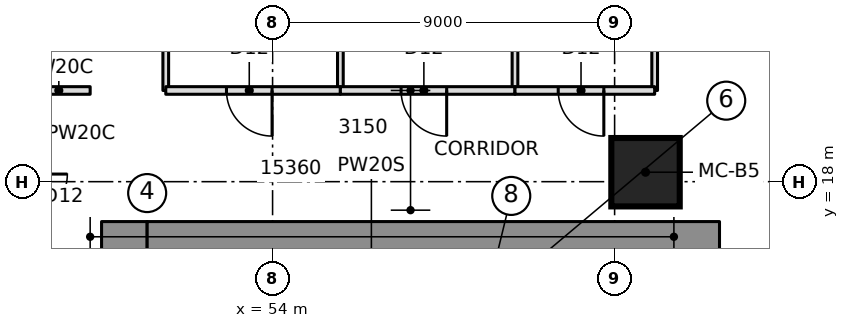
"""IFC4 building model, lengths in metres.
Left out: names, types, materials, properties, quantities, classifications, styles, units other than length and angle.
Written with IfcOpenShell. Run it as: python <this file> out.ifc"""

import sys

from ifc_helpers import new_model, si_unit, direction, frame, frame_2d, origin, origin_2d, place, context, subcontext, project, spatial, rectangle, extrude, element, fill, save


model = new_model("IFC4")
c1 = context("Model", 3, precision=1e-05, world=origin(), true_north=direction((0.0, 1.0)))
c2 = subcontext(c1, "Body", "Model", "MODEL_VIEW")
j1 = project(units=[si_unit("LENGTHUNIT", "METRE"), si_unit("PLANEANGLEUNIT", "RADIAN")], contexts=[c1])
p1 = place(None, origin())
s1 = spatial("IfcSite", under=j1, at=p1, CompositionType="ELEMENT")
p2 = place(p1, origin())
s2 = spatial("IfcBuilding", under=s1, at=p2, CompositionType="ELEMENT")
p3 = place(p2, origin())
s3 = spatial("IfcBuildingStorey", under=s2, at=p3, CompositionType="ELEMENT", Elevation=0.0)
p4 = place(p3, frame((50.1, 6.65, 0.0), z_axis=(0.0, 0.0, 1.0), x_axis=(0.0, 1.0, 0.0)))
e1 = element("IfcWall", 1, at=p4, inside=s3, PredefinedType="SHEAR", context=c2, shape_type="SweptSolid", body=[
    extrude(rectangle(XDim=10.3, YDim=1.2, at=frame_2d((5.15, 0.0))), origin(), (0.0, 0.0, 1.0), 8.0),
])
p5 = place(p4, frame((6.5, 0.0, 0.0)))
e2 = element("IfcOpeningElement", 2, at=p5, cuts=e1, PredefinedType="OPENING", context=c2, shape_type="SweptSolid", body=[
    extrude(rectangle(XDim=1.1, YDim=2.1, at=frame_2d((0.55, 1.05))), frame((0.0, 0.61, 0.0), z_axis=(0.0, -1.0, 0.0), x_axis=(1.0, 0.0, 0.0)), (0.0, 0.0, 1.0), 1.22),
])
p6 = place(p3, frame((50.7, 16.35, 0.0), z_axis=(0.0, 0.0, 1.0), x_axis=(1.0, 0.0, 0.0)))
e3 = element("IfcWall", 3, at=p6, inside=s3, PredefinedType="SHEAR", context=c2, shape_type="SweptSolid", body=[
    extrude(rectangle(XDim=15.06, YDim=1.2, at=frame_2d((7.53, 0.0))), origin(), (0.0, 0.0, 1.0), 8.0),
])
p7 = place(p3, frame((63.813, 18.249, 0.0), z_axis=(0.0, 0.0, 1.0), x_axis=(1.0, 0.0, 0.0)))
e4 = element("IfcColumn", 4, at=p7, inside=s3, PredefinedType="COLUMN", context=c2, shape_type="SweptSolid", body=[
    extrude(rectangle(XDim=1.8, YDim=1.8, at=origin_2d()), origin(), (0.0, 0.0, 1.0), 8.0),
])
for number, where, z_axis, x_axis in (
    (5, (51.189, 20.4, 0.0), (0.0, 0.0, 1.0), (0.0, 1.0, 0.0)),
    (6, (55.784, 20.4, 0.0), (0.0, 0.0, 1.0), (0.0, 1.0, 0.0)),
):
    element("IfcWall", number, at=place(p3, frame(where, z_axis=z_axis, x_axis=x_axis)), inside=s3, PredefinedType="PARTITIONING", context=c2, shape_type="SweptSolid", body=[
        extrude(rectangle(XDim=16.2, YDim=0.15, at=frame_2d((8.1, 0.0))), origin(), (0.0, 0.0, 1.0), 7.65),
    ])
for number, where, z_axis, x_axis in (
    (7, (60.378, 20.4, 0.0), (0.0, 0.0, 1.0), (0.0, 1.0, 0.0)),
    (8, (64.054, 20.4, 0.0), (0.0, 0.0, 1.0), (0.0, 1.0, 0.0)),
):
    element("IfcWall", number, at=place(p3, frame(where, z_axis=z_axis, x_axis=x_axis)), inside=s3, PredefinedType="PARTITIONING", context=c2, shape_type="SweptSolid", body=[
        extrude(rectangle(XDim=16.17, YDim=0.15, at=frame_2d((8.085, 0.0))), origin(), (0.0, 0.0, 1.0), 7.65),
    ])
p8 = place(p3, frame((55.784, 20.4, 0.0), z_axis=(0.0, 0.0, 1.0), x_axis=(-1.0, 0.0, 0.0)))
e9 = element("IfcWall", 9, at=p8, inside=s3, PredefinedType="PARTITIONING", context=c2, shape_type="SweptSolid", body=[
    extrude(rectangle(XDim=4.594, YDim=0.2, at=frame_2d((2.297, 0.0))), origin(), (0.0, 0.0, 1.0), 7.65),
])
p9 = place(p8, frame((1.797, 0.0, 0.0)))
e10 = element("IfcOpeningElement", 10, at=p9, cuts=e9, PredefinedType="OPENING", context=c2, shape_type="SweptSolid", body=[
    extrude(rectangle(XDim=1.2, YDim=2.1, at=frame_2d((0.6, 1.05))), frame((0.0, 0.11, 0.0), z_axis=(0.0, -1.0, 0.0), x_axis=(1.0, 0.0, 0.0)), (0.0, 0.0, 1.0), 0.22),
])
p10 = place(p3, frame((60.378, 20.4, 0.0), z_axis=(0.0, 0.0, 1.0), x_axis=(-1.0, 0.0, 0.0)))
e11 = element("IfcWall", 11, at=p10, inside=s3, PredefinedType="PARTITIONING", context=c2, shape_type="SweptSolid", body=[
    extrude(rectangle(XDim=4.595, YDim=0.2, at=frame_2d((2.297, 0.0))), origin(), (0.0, 0.0, 1.0), 7.65),
])
p11 = place(p10, frame((1.797, 0.0, 0.0)))
e12 = element("IfcOpeningElement", 12, at=p11, cuts=e11, PredefinedType="OPENING", context=c2, shape_type="SweptSolid", body=[
    extrude(rectangle(XDim=1.2, YDim=2.1, at=frame_2d((0.6, 1.05))), frame((0.0, 0.11, 0.0), z_axis=(0.0, -1.0, 0.0), x_axis=(1.0, 0.0, 0.0)), (0.0, 0.0, 1.0), 0.22),
])
p12 = place(p3, frame((64.054, 20.4, 0.0), z_axis=(0.0, 0.0, 1.0), x_axis=(-1.0, 0.0, 0.0)))
e13 = element("IfcWall", 13, at=p12, inside=s3, PredefinedType="PARTITIONING", context=c2, shape_type="SweptSolid", body=[
    extrude(rectangle(XDim=3.676, YDim=0.2, at=frame_2d((1.838, 0.0))), origin(), (0.0, 0.0, 1.0), 7.65),
])
p13 = place(p12, frame((1.338, 0.0, 0.0)))
e14 = element("IfcOpeningElement", 14, at=p13, cuts=e13, PredefinedType="OPENING", context=c2, shape_type="SweptSolid", body=[
    extrude(rectangle(XDim=1.2, YDim=2.1, at=frame_2d((0.6, 1.05))), frame((0.0, 0.11, 0.0), z_axis=(0.0, -1.0, 0.0), x_axis=(1.0, 0.0, 0.0)), (0.0, 0.0, 1.0), 0.22),
])
p14 = place(p3, frame((47.55, 20.4, 0.0), z_axis=(0.0, 0.0, 1.0), x_axis=(1.0, 0.0, 0.0)))
e15 = element("IfcWall", 15, at=p14, inside=s3, PredefinedType="PARTITIONING", context=c2, shape_type="SweptSolid", body=[
    extrude(rectangle(XDim=1.65, YDim=0.2, at=frame_2d((0.825, 0.0))), origin(), (0.0, 0.0, 1.0), 7.65),
])
p15 = place(p9, origin())
e16 = element("IfcDoor", 16, at=p15, inside=s3, OperationType="SINGLE_SWING_RIGHT", PredefinedType="DOOR", context=c2, shape_type="SweptSolid", body=[
    extrude(rectangle(XDim=1.2, YDim=2.1, at=frame_2d((0.6, 1.05))), frame((0.0, 0.025, 0.0), z_axis=(0.0, -1.0, 0.0), x_axis=(1.0, 0.0, 0.0)), (0.0, 0.0, 1.0), 0.05),
])
fill(e10, e16)
p16 = place(p11, origin())
e17 = element("IfcDoor", 17, at=p16, inside=s3, OperationType="SINGLE_SWING_RIGHT", PredefinedType="DOOR", context=c2, shape_type="SweptSolid", body=[
    extrude(rectangle(XDim=1.2, YDim=2.1, at=frame_2d((0.6, 1.05))), frame((0.0, 0.025, 0.0), z_axis=(0.0, -1.0, 0.0), x_axis=(1.0, 0.0, 0.0)), (0.0, 0.0, 1.0), 0.05),
])
fill(e12, e17)
p17 = place(p13, origin())
e18 = element("IfcDoor", 18, at=p17, inside=s3, OperationType="SINGLE_SWING_RIGHT", PredefinedType="DOOR", context=c2, shape_type="SweptSolid", body=[
    extrude(rectangle(XDim=1.2, YDim=2.1, at=frame_2d((0.6, 1.05))), frame((0.0, 0.025, 0.0), z_axis=(0.0, -1.0, 0.0), x_axis=(1.0, 0.0, 0.0)), (0.0, 0.0, 1.0), 0.05),
])
fill(e14, e18)
save(model, sys.argv[1])
